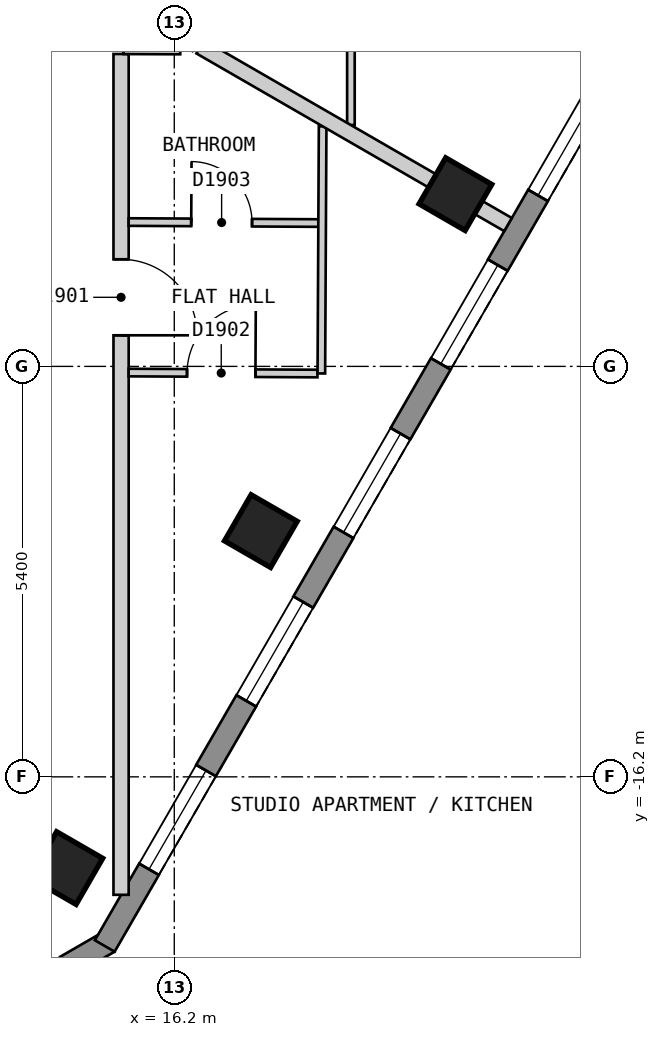
"""IFC4 building model, lengths in metres.
Left out: names, types, materials, properties, quantities, classifications, styles, units other than length and angle.
Written with IfcOpenShell. Run it as: python <this file> out.ifc"""

import sys

from ifc_helpers import new_model, si_unit, direction, frame, frame_2d, origin, origin_2d, place, context, subcontext, project, spatial, polyline, rectangle, outline, extrude, element, fill, save


model = new_model("IFC4")
c1 = context("Model", 3, precision=1e-05, world=origin(), true_north=direction((0.0, 1.0)))
c2 = subcontext(c1, "Body", "Model", "MODEL_VIEW")
j1 = project(units=[si_unit("LENGTHUNIT", "METRE"), si_unit("PLANEANGLEUNIT", "RADIAN")], contexts=[c1])
p1 = place(None, origin())
s1 = spatial("IfcSite", under=j1, at=p1, CompositionType="ELEMENT")
p2 = place(p1, origin())
s2 = spatial("IfcBuilding", under=s1, at=p2, CompositionType="ELEMENT")
p3 = place(p2, frame((0.0, 0.0, 226.8)))
s3 = spatial("IfcBuildingStorey", under=s2, at=p3, CompositionType="ELEMENT", Elevation=226.8)
for number, where, z_axis, x_axis in (
    (1, (14.78, -17.4, 0.0), (0.0, 0.0, 1.0), (0.5, 0.866, 0.0)),
    (2, (17.339, -12.967, 0.0), (0.0, 0.0, 1.0), (0.5, 0.866, 0.0)),
    (3, (19.899, -8.534, 0.0), (0.0, 0.0, 1.0), (0.5, 0.866, 0.0)),
):
    element("IfcColumn", number, at=place(p3, frame(where, z_axis=z_axis, x_axis=x_axis)), inside=s3, PredefinedType="COLUMN", context=c2, shape_type="SweptSolid", body=[
        extrude(rectangle(XDim=0.7, YDim=0.7, at=origin_2d()), origin(), (0.0, 0.0, 1.0), 3.0),
    ])
p4 = place(p3, frame((11.01, -20.87, 0.0), z_axis=(0.0, 0.0, 1.0), x_axis=(0.866022959057, 0.500004234368, 0.0)))
e4 = element("IfcWall", 4, at=p4, inside=s3, PredefinedType="SOLIDWALL", context=c2, shape_type="SweptSolid", body=[
    extrude(outline(polyline([(0.0, -0.15), (5.0, -0.15), (4.92, 0.15), (0.08, 0.15), (0.0, -0.15)])), origin(), (0.0, 0.0, 1.0), 2.7),
])
p5 = place(p4, frame((0.65, 0.0, 0.15)))
e5 = element("IfcOpeningElement", 5, at=p5, cuts=e4, PredefinedType="OPENING", context=c2, shape_type="SweptSolid", body=[
    extrude(rectangle(XDim=1.2, YDim=2.1, at=frame_2d((0.6, 1.05))), frame((0.0, 0.16, 0.0), z_axis=(0.0, -1.0, 0.0), x_axis=(1.0, 0.0, 0.0)), (0.0, 0.0, 1.0), 0.32),
])
p6 = place(p4, frame((3.149, 0.0, 0.15)))
e6 = element("IfcOpeningElement", 6, at=p6, cuts=e4, PredefinedType="OPENING", context=c2, shape_type="SweptSolid", body=[
    extrude(rectangle(XDim=1.2, YDim=2.1, at=frame_2d((0.6, 1.05))), frame((0.0, 0.16, 0.0), z_axis=(0.0, -1.0, 0.0), x_axis=(1.0, 0.0, 0.0)), (0.0, 0.0, 1.0), 0.32),
])
p7 = place(p3, frame((15.285, -18.425, 0.0), z_axis=(0.0, 0.0, 1.0), x_axis=(0.500012653391, 0.866018098222, 0.0)))
e7 = element("IfcWall", 7, at=p7, inside=s3, PredefinedType="SOLIDWALL", context=c2, shape_type="SweptSolid", body=[
    extrude(outline(polyline([(0.0, -0.15), (16.628, -0.15), (16.548, 0.15), (0.08, 0.15), (0.0, -0.15)])), origin(), (0.0, 0.0, 1.0), 2.7),
])
p8 = place(p7, frame((1.165, 0.0, 0.15)))
e8 = element("IfcOpeningElement", 8, at=p8, cuts=e7, PredefinedType="OPENING", context=c2, shape_type="SweptSolid", body=[
    extrude(rectangle(XDim=1.5, YDim=2.1, at=frame_2d((0.75, 1.05))), frame((0.0, 0.16, 0.0), z_axis=(0.0, -1.0, 0.0), x_axis=(1.0, 0.0, 0.0)), (0.0, 0.0, 1.0), 0.32),
])
p9 = place(p7, frame((3.724, 0.0, 0.15)))
e9 = element("IfcOpeningElement", 9, at=p9, cuts=e7, PredefinedType="OPENING", context=c2, shape_type="SweptSolid", body=[
    extrude(rectangle(XDim=1.5, YDim=2.1, at=frame_2d((0.75, 1.05))), frame((0.0, 0.16, 0.0), z_axis=(0.0, -1.0, 0.0), x_axis=(1.0, 0.0, 0.0)), (0.0, 0.0, 1.0), 0.32),
])
p10 = place(p7, frame((6.283, 0.0, 0.15)))
e10 = element("IfcOpeningElement", 10, at=p10, cuts=e7, PredefinedType="OPENING", context=c2, shape_type="SweptSolid", body=[
    extrude(rectangle(XDim=1.5, YDim=2.1, at=frame_2d((0.75, 1.05))), frame((0.0, 0.16, 0.0), z_axis=(0.0, -1.0, 0.0), x_axis=(1.0, 0.0, 0.0)), (0.0, 0.0, 1.0), 0.32),
])
p11 = place(p7, frame((8.843, 0.0, 0.15)))
e11 = element("IfcOpeningElement", 11, at=p11, cuts=e7, PredefinedType="OPENING", context=c2, shape_type="SweptSolid", body=[
    extrude(rectangle(XDim=1.5, YDim=2.1, at=frame_2d((0.75, 1.05))), frame((0.0, 0.16, 0.0), z_axis=(0.0, -1.0, 0.0), x_axis=(1.0, 0.0, 0.0)), (0.0, 0.0, 1.0), 0.32),
])
p12 = place(p7, frame((11.402, 0.0, 0.15)))
e12 = element("IfcOpeningElement", 12, at=p12, cuts=e7, PredefinedType="OPENING", context=c2, shape_type="SweptSolid", body=[
    extrude(rectangle(XDim=1.5, YDim=2.1, at=frame_2d((0.75, 1.05))), frame((0.0, 0.16, 0.0), z_axis=(0.0, -1.0, 0.0), x_axis=(1.0, 0.0, 0.0)), (0.0, 0.0, 1.0), 0.32),
])
p13 = place(p7, frame((13.962, 0.0, 0.15)))
e13 = element("IfcOpeningElement", 13, at=p13, cuts=e7, PredefinedType="OPENING", context=c2, shape_type="SweptSolid", body=[
    extrude(rectangle(XDim=1.5, YDim=2.1, at=frame_2d((0.75, 1.05))), frame((0.0, 0.16, 0.0), z_axis=(0.0, -1.0, 0.0), x_axis=(1.0, 0.0, 0.0)), (0.0, 0.0, 1.0), 0.32),
])
p14 = place(p3, frame((15.5, -17.752, 0.0), z_axis=(0.0, 0.0, 1.0), x_axis=(0.0, 1.0, 0.0)))
e14 = element("IfcWall", 14, at=p14, inside=s3, PredefinedType="PARTITIONING", context=c2, shape_type="SweptSolid", body=[
    extrude(rectangle(XDim=11.062, YDim=0.2, at=frame_2d((5.531, 0.0))), origin(), (0.0, 0.0, 1.0), 2.7),
])
p15 = place(p14, frame((7.361, 0.0, 0.0)))
e15 = element("IfcOpeningElement", 15, at=p15, cuts=e14, PredefinedType="OPENING", context=c2, shape_type="SweptSolid", body=[
    extrude(rectangle(XDim=1.0, YDim=2.1, at=frame_2d((0.5, 1.05))), frame((0.0, 0.11, 0.0), z_axis=(0.0, -1.0, 0.0), x_axis=(1.0, 0.0, 0.0)), (0.0, 0.0, 1.0), 0.22),
])
p16 = place(p3, frame((15.6, -8.901, 0.0), z_axis=(0.0, 0.0, 1.0), x_axis=(0.999986038514, -0.005284200615, 0.0)))
e16 = element("IfcWall", 16, at=p16, inside=s3, PredefinedType="PARTITIONING", context=c2, shape_type="SweptSolid", body=[
    extrude(rectangle(XDim=2.495, YDim=0.1, at=frame_2d((1.248, 0.0))), origin(), (0.0, 0.0, 1.0), 2.7),
])
p17 = place(p16, frame((0.823, 0.0, 0.0)))
e17 = element("IfcOpeningElement", 17, at=p17, cuts=e16, PredefinedType="OPENING", context=c2, shape_type="SweptSolid", body=[
    extrude(rectangle(XDim=0.8, YDim=2.1, at=frame_2d((0.4, 1.05))), frame((0.0, 0.06, 0.0), z_axis=(0.0, -1.0, 0.0), x_axis=(1.0, 0.0, 0.0)), (0.0, 0.0, 1.0), 0.12),
])
p18 = place(p3, frame((15.6, -10.881, 0.0), z_axis=(0.0, 0.0, 1.0), x_axis=(0.999986431575, -0.005209286502, 0.0)))
e18 = element("IfcWall", 18, at=p18, inside=s3, PredefinedType="PARTITIONING", context=c2, shape_type="SweptSolid", body=[
    extrude(rectangle(XDim=2.484, YDim=0.1, at=frame_2d((1.242, 0.0))), origin(), (0.0, 0.0, 1.0), 2.7),
])
p19 = place(p18, frame((0.768, 0.0, 0.0)))
e19 = element("IfcOpeningElement", 19, at=p19, cuts=e18, PredefinedType="OPENING", context=c2, shape_type="SweptSolid", body=[
    extrude(rectangle(XDim=0.9, YDim=2.1, at=frame_2d((0.45, 1.05))), frame((0.0, 0.06, 0.0), z_axis=(0.0, -1.0, 0.0), x_axis=(1.0, 0.0, 0.0)), (0.0, 0.0, 1.0), 0.12),
])
p20 = place(p3, frame((18.135, -10.893, 0.0), z_axis=(0.0, 0.0, 1.0), x_axis=(0.005255182688, 0.999986191432, 0.0)))
e20 = element("IfcWall", 20, at=p20, inside=s3, PredefinedType="PARTITIONING", context=c2, shape_type="SweptSolid", body=[
    extrude(rectangle(XDim=3.252, YDim=0.1, at=frame_2d((1.626, 0.0))), origin(), (0.0, 0.0, 1.0), 2.7),
])
p21 = place(p3, frame((18.524, -7.625, 0.0), z_axis=(0.0, 0.0, 1.0), x_axis=(0.0, 1.0, 0.0)))
e21 = element("IfcWall", 21, at=p21, inside=s3, PredefinedType="PARTITIONING", context=c2, shape_type="SweptSolid", body=[
    extrude(rectangle(XDim=3.089, YDim=0.1, at=frame_2d((1.544, 0.0))), origin(), (0.0, 0.0, 1.0), 2.7),
])
p22 = place(p3, frame((15.53, -6.591, 0.0), z_axis=(0.0, 0.0, 1.0), x_axis=(0.999992350786, -0.003911312976, 0.0)))
e22 = element("IfcWall", 22, at=p22, inside=s3, PredefinedType="PARTITIONING", context=c2, shape_type="SweptSolid", body=[
    extrude(rectangle(XDim=0.749, YDim=0.2, at=frame_2d((0.375, 0.0))), origin(), (0.0, 0.0, 1.0), 2.7),
])
p23 = place(p3, frame((16.541, -6.596, 0.0), z_axis=(0.0, 0.0, 1.0), x_axis=(0.866040404911, -0.499974016386, 0.0)))
e23 = element("IfcWall", 23, at=p23, inside=s3, PredefinedType="PARTITIONING", context=c2, shape_type="SweptSolid", body=[
    extrude(rectangle(XDim=4.677, YDim=0.2, at=frame_2d((2.338, 0.0))), origin(), (0.0, 0.0, 1.0), 2.7),
])
p24 = place(p8, origin())
e24 = element("IfcWindow", 24, at=p24, inside=s3, PartitioningType="SINGLE_PANEL", PredefinedType="WINDOW", context=c2, shape_type="SweptSolid", body=[
    extrude(rectangle(XDim=1.5, YDim=2.1, at=frame_2d((0.75, 1.05))), frame((0.0, 0.03, 0.0), z_axis=(0.0, -1.0, 0.0), x_axis=(1.0, 0.0, 0.0)), (0.0, 0.0, 1.0), 0.06),
])
fill(e8, e24)
p25 = place(p9, origin())
e25 = element("IfcWindow", 25, at=p25, inside=s3, PartitioningType="SINGLE_PANEL", PredefinedType="WINDOW", context=c2, shape_type="SweptSolid", body=[
    extrude(rectangle(XDim=1.5, YDim=2.1, at=frame_2d((0.75, 1.05))), frame((0.0, 0.03, 0.0), z_axis=(0.0, -1.0, 0.0), x_axis=(1.0, 0.0, 0.0)), (0.0, 0.0, 1.0), 0.06),
])
fill(e9, e25)
p26 = place(p10, origin())
e26 = element("IfcWindow", 26, at=p26, inside=s3, PartitioningType="SINGLE_PANEL", PredefinedType="WINDOW", context=c2, shape_type="SweptSolid", body=[
    extrude(rectangle(XDim=1.5, YDim=2.1, at=frame_2d((0.75, 1.05))), frame((0.0, 0.03, 0.0), z_axis=(0.0, -1.0, 0.0), x_axis=(1.0, 0.0, 0.0)), (0.0, 0.0, 1.0), 0.06),
])
fill(e10, e26)
p27 = place(p11, origin())
e27 = element("IfcWindow", 27, at=p27, inside=s3, PartitioningType="SINGLE_PANEL", PredefinedType="WINDOW", context=c2, shape_type="SweptSolid", body=[
    extrude(rectangle(XDim=1.5, YDim=2.1, at=frame_2d((0.75, 1.05))), frame((0.0, 0.03, 0.0), z_axis=(0.0, -1.0, 0.0), x_axis=(1.0, 0.0, 0.0)), (0.0, 0.0, 1.0), 0.06),
])
fill(e11, e27)
p28 = place(p12, origin())
e28 = element("IfcWindow", 28, at=p28, inside=s3, PartitioningType="SINGLE_PANEL", PredefinedType="WINDOW", context=c2, shape_type="SweptSolid", body=[
    extrude(rectangle(XDim=1.5, YDim=2.1, at=frame_2d((0.75, 1.05))), frame((0.0, 0.03, 0.0), z_axis=(0.0, -1.0, 0.0), x_axis=(1.0, 0.0, 0.0)), (0.0, 0.0, 1.0), 0.06),
])
fill(e12, e28)
p29 = place(p15, origin())
e29 = element("IfcDoor", 29, at=p29, inside=s3, OperationType="SINGLE_SWING_LEFT", PredefinedType="DOOR", context=c2, shape_type="SweptSolid", body=[
    extrude(rectangle(XDim=1.0, YDim=2.1, at=frame_2d((0.5, 1.05))), frame((0.0, 0.025, 0.0), z_axis=(0.0, -1.0, 0.0), x_axis=(1.0, 0.0, 0.0)), (0.0, 0.0, 1.0), 0.05),
])
fill(e15, e29)
p30 = place(p19, origin())
e30 = element("IfcDoor", 30, at=p30, inside=s3, OperationType="SINGLE_SWING_RIGHT", PredefinedType="DOOR", context=c2, shape_type="SweptSolid", body=[
    extrude(rectangle(XDim=0.9, YDim=2.1, at=frame_2d((0.45, 1.05))), frame((0.0, 0.025, 0.0), z_axis=(0.0, -1.0, 0.0), x_axis=(1.0, 0.0, 0.0)), (0.0, 0.0, 1.0), 0.05),
])
fill(e19, e30)
p31 = place(p17, origin())
e31 = element("IfcDoor", 31, at=p31, inside=s3, OperationType="SINGLE_SWING_LEFT", PredefinedType="DOOR", context=c2, shape_type="SweptSolid", body=[
    extrude(rectangle(XDim=0.8, YDim=2.1, at=frame_2d((0.4, 1.05))), frame((0.0, 0.025, 0.0), z_axis=(0.0, -1.0, 0.0), x_axis=(1.0, 0.0, 0.0)), (0.0, 0.0, 1.0), 0.05),
])
fill(e17, e31)
save(model, sys.argv[1])
